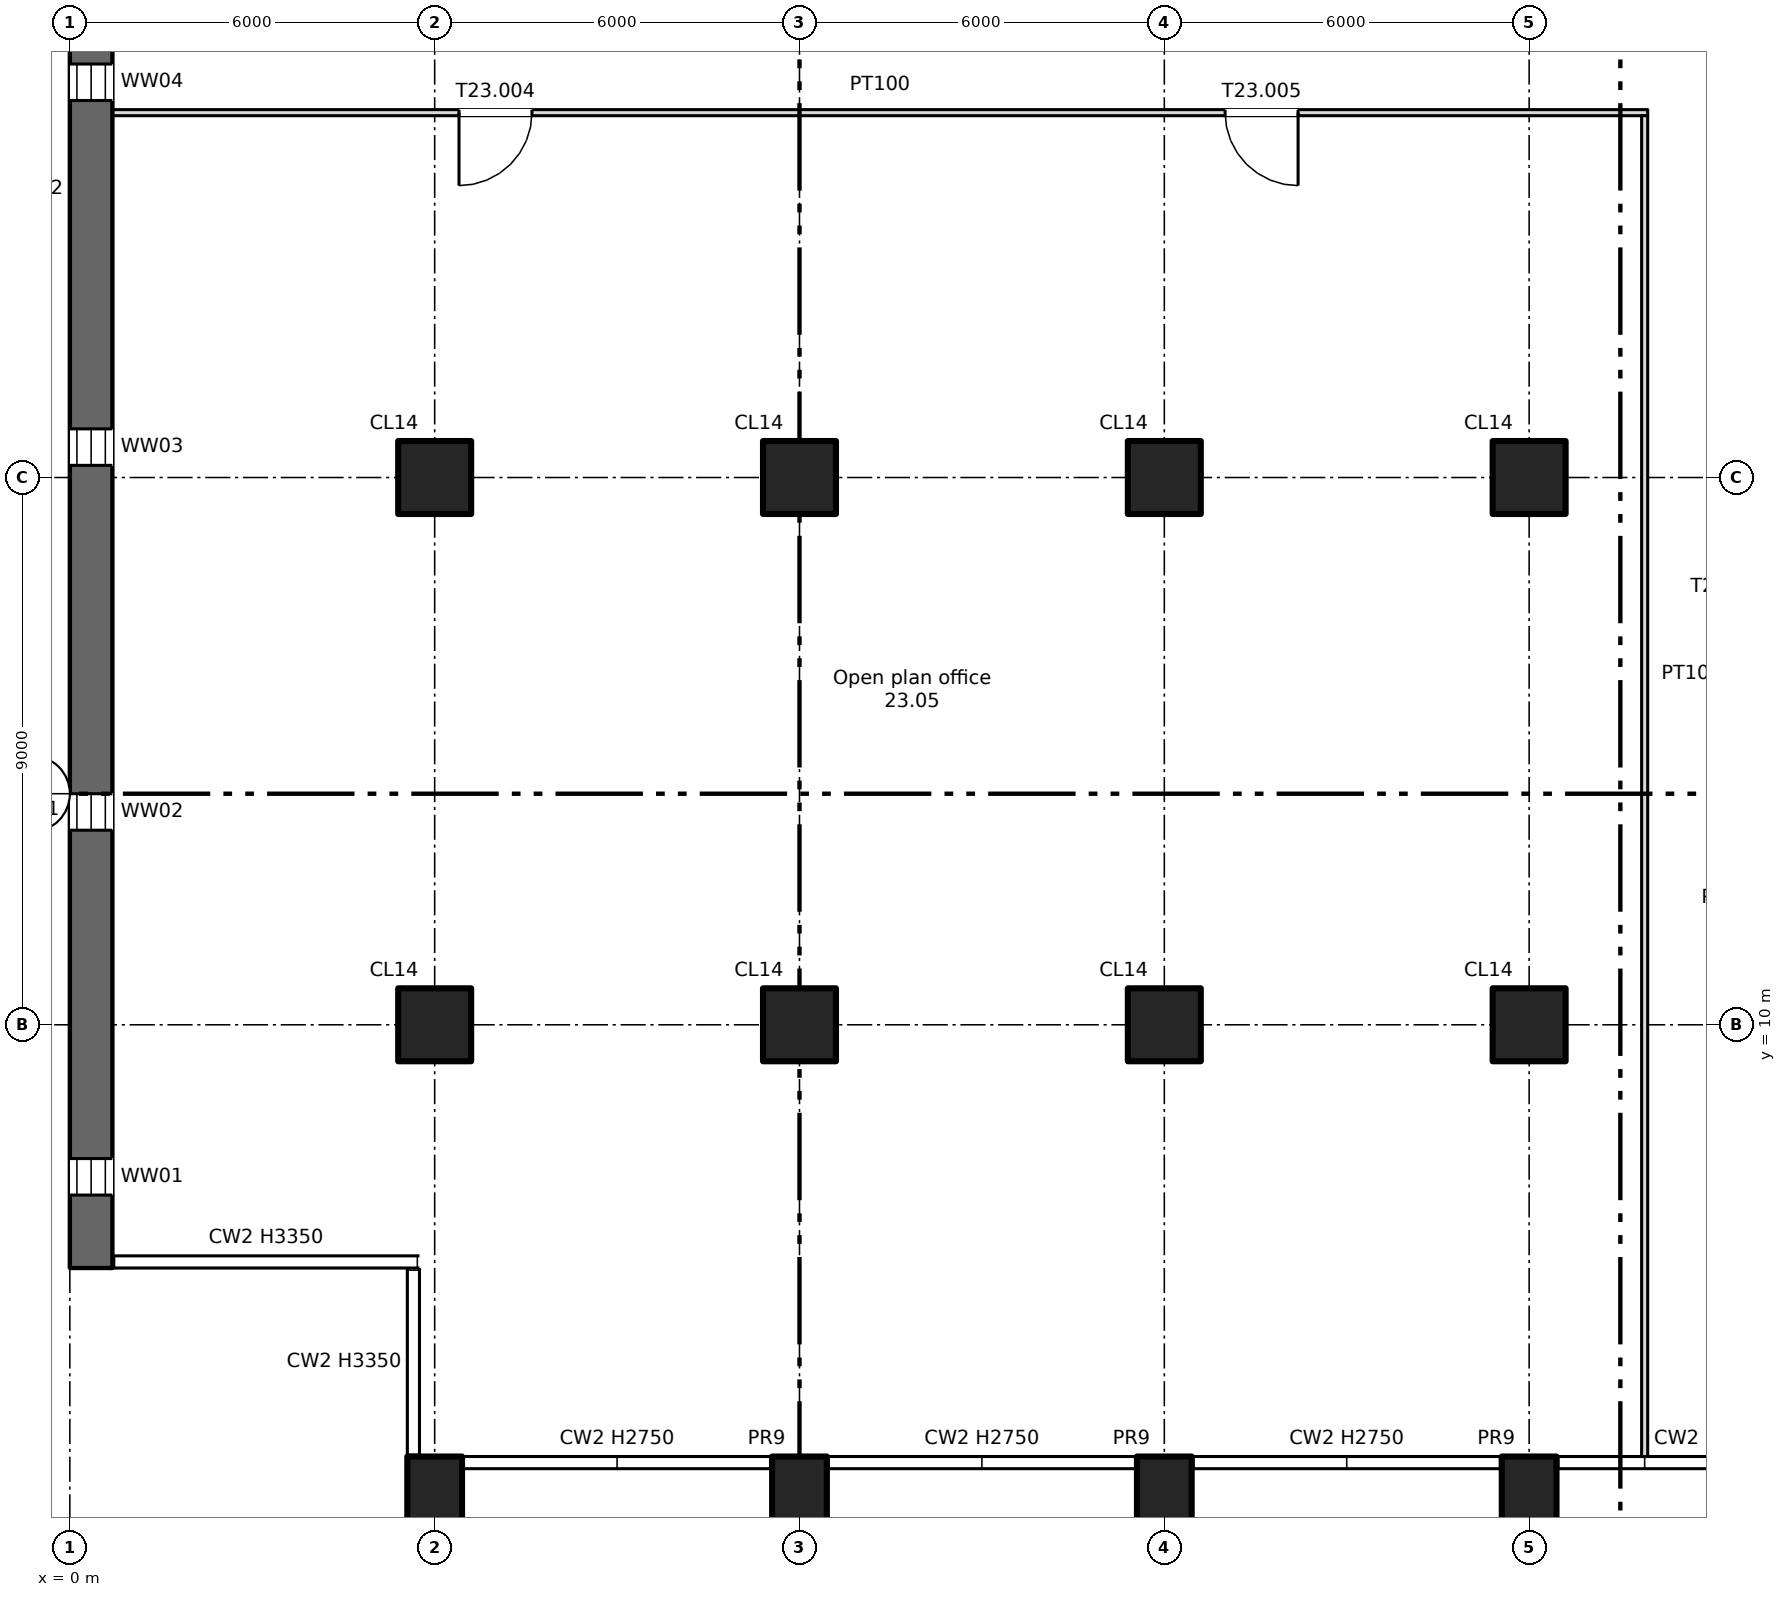
"""IFC4 building model, lengths in metres.
Left out: names, types, materials, properties, quantities, classifications, styles, units other than length and angle.
Written with IfcOpenShell. Run it as: python <this file> out.ifc"""

import sys

from ifc_helpers import new_model, si_unit, direction, frame, frame_2d, origin, origin_2d, place, context, subcontext, project, spatial, rectangle, extrude, element, fill, save


model = new_model("IFC4")
c1 = context("Model", 3, precision=1e-05, world=origin(), true_north=direction((0.0, 1.0)))
c2 = subcontext(c1, "Body", "Model", "MODEL_VIEW")
j1 = project(units=[si_unit("LENGTHUNIT", "METRE"), si_unit("PLANEANGLEUNIT", "RADIAN")], contexts=[c1])
p1 = place(None, origin())
s1 = spatial("IfcSite", under=j1, at=p1, CompositionType="ELEMENT")
p2 = place(p1, origin())
s2 = spatial("IfcBuilding", under=s1, at=p2, CompositionType="ELEMENT")
p3 = place(p2, frame((0.0, 0.0, 151.25)))
s3 = spatial("IfcBuildingStorey", under=s2, at=p3, CompositionType="ELEMENT", Elevation=151.25)
for number, where, z_axis, x_axis in (
    (1, (6.0, 2.2, -0.4), (0.0, 0.0, 1.0), (1.0, 0.0, 0.0)),
    (2, (12.0, 2.2, -0.4), (0.0, 0.0, 1.0), (1.0, 0.0, 0.0)),
    (3, (18.0, 2.2, -0.4), (0.0, 0.0, 1.0), (1.0, 0.0, 0.0)),
    (4, (24.0, 2.2, -0.4), (0.0, 0.0, 1.0), (1.0, 0.0, 0.0)),
):
    element("IfcColumn", number, at=place(p3, frame(where, z_axis=z_axis, x_axis=x_axis)), inside=s3, PredefinedType="COLUMN", context=c2, shape_type="SweptSolid", body=[
        extrude(rectangle(XDim=0.9, YDim=1.4, at=origin_2d()), origin(), (0.0, 0.0, 1.0), 3.75),
    ])
for number, where, z_axis, x_axis in (
    (5, (6.0, 10.0, 0.0), (0.0, 0.0, 1.0), (1.0, 0.0, 0.0)),
    (6, (6.0, 19.0, 0.0), (0.0, 0.0, 1.0), (1.0, 0.0, 0.0)),
    (7, (12.0, 10.0, 0.0), (0.0, 0.0, 1.0), (1.0, 0.0, 0.0)),
    (8, (12.0, 19.0, 0.0), (0.0, 0.0, 1.0), (1.0, 0.0, 0.0)),
    (9, (18.0, 10.0, 0.0), (0.0, 0.0, 1.0), (1.0, 0.0, 0.0)),
    (10, (18.0, 19.0, 0.0), (0.0, 0.0, 1.0), (1.0, 0.0, 0.0)),
    (11, (24.0, 10.0, 0.0), (0.0, 0.0, 1.0), (1.0, 0.0, 0.0)),
    (12, (24.0, 19.0, 0.0), (0.0, 0.0, 1.0), (1.0, 0.0, 0.0)),
):
    element("IfcColumn", number, at=place(p3, frame(where, z_axis=z_axis, x_axis=x_axis)), inside=s3, PredefinedType="COLUMN", context=c2, shape_type="SweptSolid", body=[
        extrude(rectangle(XDim=1.2, YDim=1.2, at=origin_2d()), origin(), (0.0, 0.0, 1.0), 3.35),
    ])
p4 = place(p3, frame((0.35, 6.0, 0.0), z_axis=(0.0, 0.0, 1.0), x_axis=(0.0, 1.0, 0.0)))
e13 = element("IfcWall", 13, at=p4, inside=s3, PredefinedType="SHEAR", context=c2, shape_type="SweptSolid", body=[
    extrude(rectangle(XDim=35.5, YDim=0.7, at=frame_2d((17.75, 0.0))), origin(), (0.0, 0.0, 1.0), 3.35),
])
p5 = place(p4, frame((1.2, 0.0, 0.6)))
e14 = element("IfcOpeningElement", 14, at=p5, cuts=e13, PredefinedType="OPENING", context=c2, shape_type="SweptSolid", body=[
    extrude(rectangle(XDim=0.6, YDim=2.4, at=frame_2d((0.3, 1.2))), frame((0.0, 0.36, 0.0), z_axis=(0.0, -1.0, 0.0), x_axis=(1.0, 0.0, 0.0)), (0.0, 0.0, 1.0), 0.72),
])
p6 = place(p4, frame((7.2, 0.0, 0.6)))
e15 = element("IfcOpeningElement", 15, at=p6, cuts=e13, PredefinedType="OPENING", context=c2, shape_type="SweptSolid", body=[
    extrude(rectangle(XDim=0.6, YDim=2.4, at=frame_2d((0.3, 1.2))), frame((0.0, 0.36, 0.0), z_axis=(0.0, -1.0, 0.0), x_axis=(1.0, 0.0, 0.0)), (0.0, 0.0, 1.0), 0.72),
])
p7 = place(p4, frame((13.2, 0.0, 0.6)))
e16 = element("IfcOpeningElement", 16, at=p7, cuts=e13, PredefinedType="OPENING", context=c2, shape_type="SweptSolid", body=[
    extrude(rectangle(XDim=0.6, YDim=2.4, at=frame_2d((0.3, 1.2))), frame((0.0, 0.36, 0.0), z_axis=(0.0, -1.0, 0.0), x_axis=(1.0, 0.0, 0.0)), (0.0, 0.0, 1.0), 0.72),
])
p8 = place(p4, frame((19.2, 0.0, 0.6)))
e17 = element("IfcOpeningElement", 17, at=p8, cuts=e13, PredefinedType="OPENING", context=c2, shape_type="SweptSolid", body=[
    extrude(rectangle(XDim=0.6, YDim=2.4, at=frame_2d((0.3, 1.2))), frame((0.0, 0.36, 0.0), z_axis=(0.0, -1.0, 0.0), x_axis=(1.0, 0.0, 0.0)), (0.0, 0.0, 1.0), 0.72),
])
p9 = place(p4, frame((25.2, 0.0, 0.6)))
e18 = element("IfcOpeningElement", 18, at=p9, cuts=e13, PredefinedType="OPENING", context=c2, shape_type="SweptSolid", body=[
    extrude(rectangle(XDim=0.6, YDim=2.4, at=frame_2d((0.3, 1.2))), frame((0.0, 0.36, 0.0), z_axis=(0.0, -1.0, 0.0), x_axis=(1.0, 0.0, 0.0)), (0.0, 0.0, 1.0), 0.72),
])
p10 = place(p4, frame((31.2, 0.0, 0.6)))
e19 = element("IfcOpeningElement", 19, at=p10, cuts=e13, PredefinedType="OPENING", context=c2, shape_type="SweptSolid", body=[
    extrude(rectangle(XDim=0.6, YDim=2.4, at=frame_2d((0.3, 1.2))), frame((0.0, 0.36, 0.0), z_axis=(0.0, -1.0, 0.0), x_axis=(1.0, 0.0, 0.0)), (0.0, 0.0, 1.0), 0.72),
])
p11 = place(p3, frame((0.7, 25.0, 0.0), z_axis=(0.0, 0.0, 1.0), x_axis=(1.0, 0.0, 0.0)))
e20 = element("IfcWall", 20, at=p11, inside=s3, PredefinedType="PARTITIONING", context=c2, shape_type="SweptSolid", body=[
    extrude(rectangle(XDim=25.25, YDim=0.1, at=frame_2d((12.625, 0.0))), origin(), (0.0, 0.0, 1.0), 3.35),
])
p12 = place(p11, frame((5.7, 0.0, 0.0)))
e21 = element("IfcOpeningElement", 21, at=p12, cuts=e20, PredefinedType="OPENING", context=c2, shape_type="SweptSolid", body=[
    extrude(rectangle(XDim=1.2, YDim=2.1, at=frame_2d((0.6, 1.05))), frame((0.0, 0.06, 0.0), z_axis=(0.0, -1.0, 0.0), x_axis=(1.0, 0.0, 0.0)), (0.0, 0.0, 1.0), 0.12),
])
p13 = place(p11, frame((18.3, 0.0, 0.0)))
e22 = element("IfcOpeningElement", 22, at=p13, cuts=e20, PredefinedType="OPENING", context=c2, shape_type="SweptSolid", body=[
    extrude(rectangle(XDim=1.2, YDim=2.1, at=frame_2d((0.6, 1.05))), frame((0.0, 0.06, 0.0), z_axis=(0.0, -1.0, 0.0), x_axis=(1.0, 0.0, 0.0)), (0.0, 0.0, 1.0), 0.12),
])
p14 = place(p3, frame((25.9, 2.9, 0.0), z_axis=(0.0, 0.0, 1.0), x_axis=(0.0, 1.0, 0.0)))
e23 = element("IfcWall", 23, at=p14, inside=s3, PredefinedType="PARTITIONING", context=c2, shape_type="SweptSolid", body=[
    extrude(rectangle(XDim=22.05, YDim=0.1, at=frame_2d((11.025, 0.0))), origin(), (0.0, 0.0, 1.0), 3.35),
])
p15 = place(p5, origin())
e24 = element("IfcWindow", 24, at=p15, inside=s3, PartitioningType="SINGLE_PANEL", PredefinedType="WINDOW", context=c2, shape_type="SweptSolid", body=[
    extrude(rectangle(XDim=0.6, YDim=2.4, at=frame_2d((0.3, 1.2))), frame((0.0, 0.03, 0.0), z_axis=(0.0, -1.0, 0.0), x_axis=(1.0, 0.0, 0.0)), (0.0, 0.0, 1.0), 0.06),
])
fill(e14, e24)
p16 = place(p6, origin())
e25 = element("IfcWindow", 25, at=p16, inside=s3, PartitioningType="SINGLE_PANEL", PredefinedType="WINDOW", context=c2, shape_type="SweptSolid", body=[
    extrude(rectangle(XDim=0.6, YDim=2.4, at=frame_2d((0.3, 1.2))), frame((0.0, 0.03, 0.0), z_axis=(0.0, -1.0, 0.0), x_axis=(1.0, 0.0, 0.0)), (0.0, 0.0, 1.0), 0.06),
])
fill(e15, e25)
p17 = place(p7, origin())
e26 = element("IfcWindow", 26, at=p17, inside=s3, PartitioningType="SINGLE_PANEL", PredefinedType="WINDOW", context=c2, shape_type="SweptSolid", body=[
    extrude(rectangle(XDim=0.6, YDim=2.4, at=frame_2d((0.3, 1.2))), frame((0.0, 0.03, 0.0), z_axis=(0.0, -1.0, 0.0), x_axis=(1.0, 0.0, 0.0)), (0.0, 0.0, 1.0), 0.06),
])
fill(e16, e26)
p18 = place(p8, origin())
e27 = element("IfcWindow", 27, at=p18, inside=s3, PartitioningType="SINGLE_PANEL", PredefinedType="WINDOW", context=c2, shape_type="SweptSolid", body=[
    extrude(rectangle(XDim=0.6, YDim=2.4, at=frame_2d((0.3, 1.2))), frame((0.0, 0.03, 0.0), z_axis=(0.0, -1.0, 0.0), x_axis=(1.0, 0.0, 0.0)), (0.0, 0.0, 1.0), 0.06),
])
fill(e17, e27)
p19 = place(p12, origin())
e28 = element("IfcDoor", 28, at=p19, inside=s3, OperationType="SINGLE_SWING_LEFT", PredefinedType="DOOR", context=c2, shape_type="SweptSolid", body=[
    extrude(rectangle(XDim=1.2, YDim=2.1, at=frame_2d((0.6, 1.05))), frame((0.0, 0.025, 0.0), z_axis=(0.0, -1.0, 0.0), x_axis=(1.0, 0.0, 0.0)), (0.0, 0.0, 1.0), 0.05),
])
fill(e21, e28)
p20 = place(p13, origin())
e29 = element("IfcDoor", 29, at=p20, inside=s3, OperationType="SINGLE_SWING_RIGHT", PredefinedType="DOOR", context=c2, shape_type="SweptSolid", body=[
    extrude(rectangle(XDim=1.2, YDim=2.1, at=frame_2d((0.6, 1.05))), frame((0.0, 0.025, 0.0), z_axis=(0.0, -1.0, 0.0), x_axis=(1.0, 0.0, 0.0)), (0.0, 0.0, 1.0), 0.05),
])
fill(e22, e29)
save(model, sys.argv[1])
